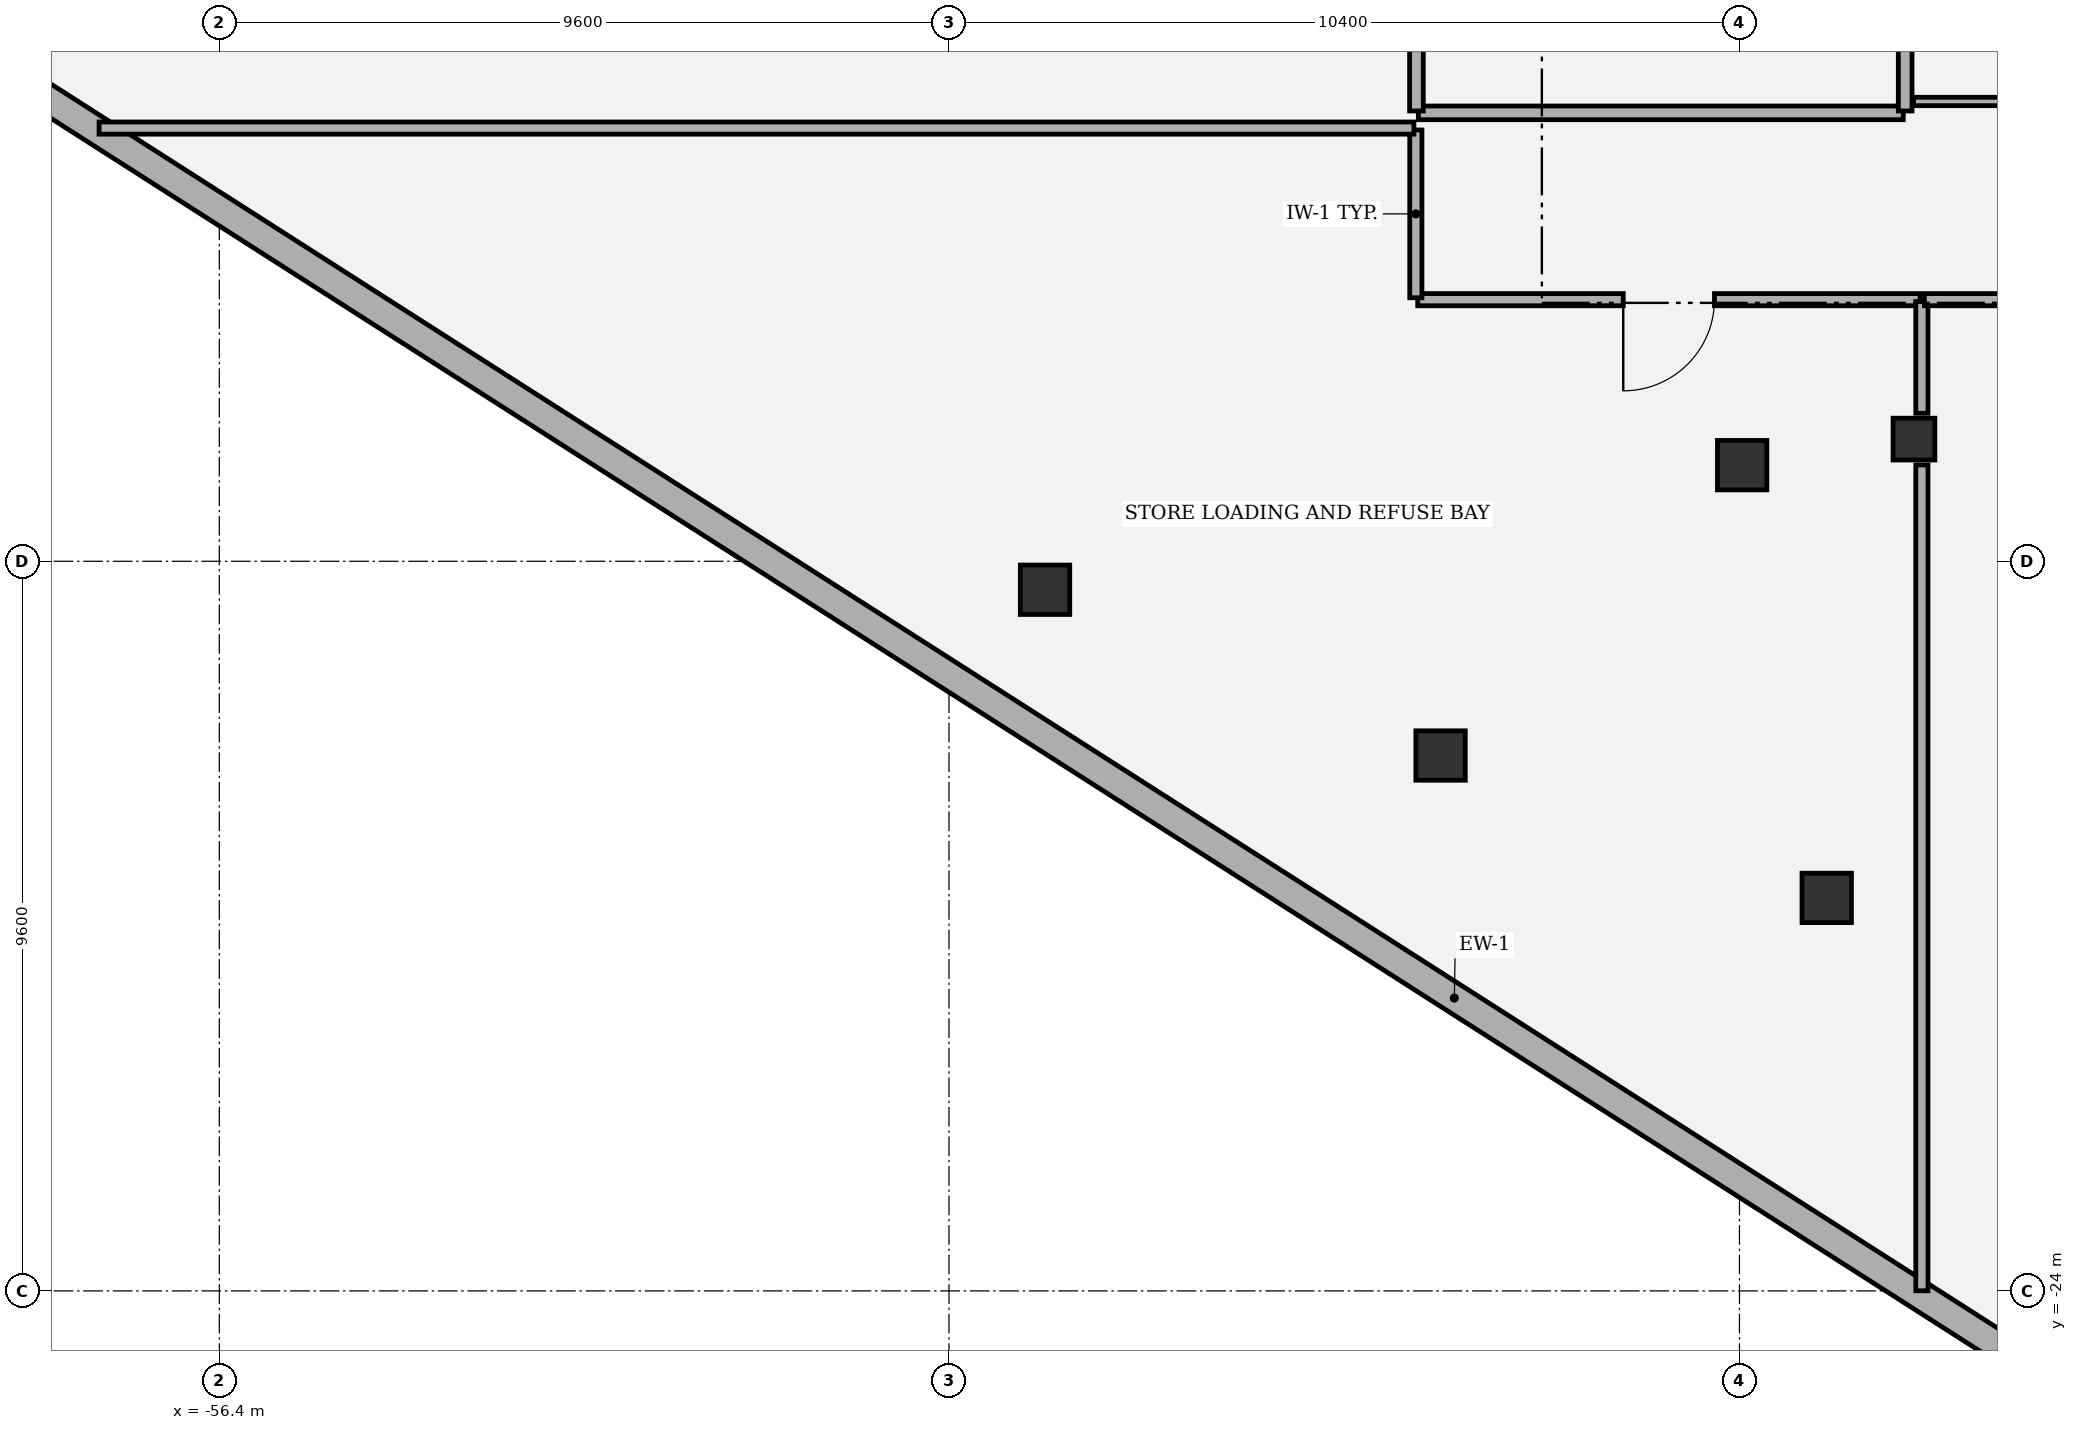
"""IFC4 building model, lengths in metres.
Left out: names, types, materials, properties, quantities, classifications, styles, units other than length and angle.
Written with IfcOpenShell. Run it as: python <this file> out.ifc"""

import sys

from ifc_helpers import new_model, si_unit, direction, frame, frame_2d, origin, origin_2d, place, context, subcontext, project, spatial, rectangle, extrude, element, fill, save


model = new_model("IFC4")
c1 = context("Model", 3, precision=1e-05, world=origin(), true_north=direction((0.0, 1.0)))
c2 = subcontext(c1, "Body", "Model", "MODEL_VIEW")
j1 = project(units=[si_unit("LENGTHUNIT", "METRE"), si_unit("PLANEANGLEUNIT", "RADIAN")], contexts=[c1])
p1 = place(None, origin())
s1 = spatial("IfcSite", under=j1, at=p1, CompositionType="ELEMENT")
p2 = place(p1, origin())
s2 = spatial("IfcBuilding", under=s1, at=p2, CompositionType="ELEMENT")
p3 = place(p2, origin())
s3 = spatial("IfcBuildingStorey", under=s2, at=p3, CompositionType="ELEMENT", Elevation=0.0)
for number, where, z_axis, x_axis in (
    (1, (-45.536, -14.775, 0.0), (0.0, 0.0, 1.0), (1.0, 0.0, 0.0)),
    (2, (-40.333, -16.956, 0.0), (0.0, 0.0, 1.0), (1.0, 0.0, 0.0)),
    (3, (-35.252, -18.829, 0.0), (0.0, 0.0, 1.0), (1.0, 0.0, 0.0)),
    (4, (-36.365, -13.135, 0.0), (0.0, 0.0, 1.0), (1.0, 0.0, 0.0)),
):
    element("IfcColumn", number, at=place(p3, frame(where, z_axis=z_axis, x_axis=x_axis)), inside=s3, PredefinedType="COLUMN", context=c2, shape_type="SweptSolid", body=[
        extrude(rectangle(XDim=0.65, YDim=0.65, at=origin_2d()), origin(), (0.0, 0.0, 1.0), 6.6),
    ])
p4 = place(p3, frame((-34.104, -12.792, 0.0), z_axis=(0.0, 0.0, 1.0), x_axis=(1.0, 0.0, 0.0)))
e5 = element("IfcColumn", 5, at=p4, inside=s3, PredefinedType="COLUMN", context=c2, shape_type="SweptSolid", body=[
    extrude(rectangle(XDim=0.55, YDim=0.55, at=origin_2d()), origin(), (0.0, 0.0, 1.0), 6.6),
])
p5 = place(p3, frame((-13.635, -37.094, 0.0), z_axis=(0.0, 0.0, 1.0), x_axis=(-0.842602364841, 0.538536214905, 0.0)))
e6 = element("IfcWall", 6, at=p5, inside=s3, PredefinedType="SOLIDWALL", context=c2, shape_type="SweptSolid", body=[
    extrude(rectangle(XDim=60.27, YDim=0.38, at=frame_2d((30.135, 0.0))), origin(), (0.0, 0.0, 1.0), 6.34),
])
p6 = place(p3, frame((-40.625, -8.5, 0.0), z_axis=(0.0, 0.0, 1.0), x_axis=(1.0, 0.0, 0.0)))
e7 = element("IfcWall", 7, at=p6, inside=s3, PredefinedType="PARTITIONING", context=c2, shape_type="SweptSolid", body=[
    extrude(rectangle(XDim=6.38, YDim=0.18, at=frame_2d((3.19, 0.0))), origin(), (0.0, 0.0, 1.0), 5.853),
])
p7 = place(p3, frame((-34.22, -8.475, 0.0), z_axis=(0.0, 0.0, 1.0), x_axis=(0.0, 1.0, 0.0)))
e8 = element("IfcWall", 8, at=p7, inside=s3, PredefinedType="PARTITIONING", context=c2, shape_type="SweptSolid", body=[
    extrude(rectangle(XDim=3.635, YDim=0.18, at=frame_2d((1.817, 0.0))), origin(), (0.0, 0.0, 1.0), 6.34),
])
p8 = place(p3, frame((-40.65, -8.475, 0.0), z_axis=(0.0, 0.0, 1.0), x_axis=(0.0, 1.0, 0.0)))
e9 = element("IfcWall", 9, at=p8, inside=s3, PredefinedType="PARTITIONING", context=c2, shape_type="SweptSolid", body=[
    extrude(rectangle(XDim=3.85, YDim=0.18, at=frame_2d((1.925, 0.0))), origin(), (0.0, 0.0, 1.0), 6.34),
])
p9 = place(p3, frame((-34.11, -8.35, 0.0), z_axis=(0.0, 0.0, 1.0), x_axis=(1.0, 0.0, 0.0)))
e10 = element("IfcWall", 10, at=p9, inside=s3, PredefinedType="PARTITIONING", context=c2, shape_type="SweptSolid", body=[
    extrude(rectangle(XDim=3.205, YDim=0.11, at=frame_2d((1.603, 0.0))), origin(), (0.0, 0.0, 1.0), 6.34),
])
p10 = place(p9, frame((1.163, 0.0, 0.0)))
e11 = element("IfcOpeningElement", 11, at=p10, cuts=e10, PredefinedType="OPENING", context=c2, shape_type="SweptSolid", body=[
    extrude(rectangle(XDim=0.88, YDim=2.1, at=frame_2d((0.44, 1.05))), frame((0.0, 0.065, 0.0), z_axis=(0.0, -1.0, 0.0), x_axis=(1.0, 0.0, 0.0)), (0.0, 0.0, 1.0), 0.13),
])
p11 = place(p3, frame((-34.025, -10.958, 0.0), z_axis=(0.0, 0.0, 1.0), x_axis=(-1.0, 0.0, 0.0)))
e12 = element("IfcWall", 12, at=p11, inside=s3, PredefinedType="PARTITIONING", context=c2, shape_type="SweptSolid", body=[
    extrude(rectangle(XDim=6.608, YDim=0.16, at=frame_2d((3.304, 0.0))), origin(), (0.0, 0.0, 1.0), 5.853),
])
p12 = place(p11, frame((2.704, 0.0, 0.0)))
e13 = element("IfcOpeningElement", 13, at=p12, cuts=e12, PredefinedType="OPENING", context=c2, shape_type="SweptSolid", body=[
    extrude(rectangle(XDim=1.2, YDim=2.15, at=frame_2d((0.6, 1.075))), frame((0.0, 0.09, 0.0), z_axis=(0.0, -1.0, 0.0), x_axis=(1.0, 0.0, 0.0)), (0.0, 0.0, 1.0), 0.18),
])
p13 = place(p3, frame((-40.658, -10.933, 0.0), z_axis=(0.0, 0.0, 1.0), x_axis=(0.0, 1.0, 0.0)))
e14 = element("IfcWall", 14, at=p13, inside=s3, PredefinedType="PARTITIONING", context=c2, shape_type="SweptSolid", body=[
    extrude(rectangle(XDim=2.208, YDim=0.16, at=frame_2d((1.104, 0.0))), origin(), (0.0, 0.0, 1.0), 6.34),
])
p14 = place(p3, frame((-40.683, -8.7, 0.0), z_axis=(0.0, 0.0, 1.0), x_axis=(-1.0, 0.0, 0.0)))
e15 = element("IfcWall", 15, at=p14, inside=s3, PredefinedType="PARTITIONING", context=c2, shape_type="SweptSolid", body=[
    extrude(rectangle(XDim=17.299, YDim=0.16, at=frame_2d((8.649, 0.0))), origin(), (0.0, 0.0, 1.0), 5.31),
])
p15 = place(p3, frame((-34.0, -23.999, 0.0), z_axis=(0.0, 0.0, 1.0), x_axis=(0.0, 1.0, 0.0)))
e16 = element("IfcWall", 16, at=p15, inside=s3, PredefinedType="PARTITIONING", context=c2, shape_type="SweptSolid", body=[
    extrude(rectangle(XDim=10.866, YDim=0.16, at=frame_2d((5.433, 0.0))), origin(), (0.0, 0.0, 1.0), 6.34),
])
p16 = place(p3, frame((-34.0, -12.452, 0.0), z_axis=(0.0, 0.0, 1.0), x_axis=(0.0, 1.0, 0.0)))
e17 = element("IfcWall", 17, at=p16, inside=s3, PredefinedType="PARTITIONING", context=c2, shape_type="SweptSolid", body=[
    extrude(rectangle(XDim=1.469, YDim=0.16, at=frame_2d((0.735, 0.0))), origin(), (0.0, 0.0, 1.0), 6.34),
])
p17 = place(p3, frame((-24.265, -10.958, 0.0), z_axis=(0.0, 0.0, 1.0), x_axis=(-1.0, 0.0, 0.0)))
e18 = element("IfcWall", 18, at=p17, inside=s3, PredefinedType="PARTITIONING", context=c2, shape_type="SweptSolid", body=[
    extrude(rectangle(XDim=9.702, YDim=0.16, at=frame_2d((4.851, 0.0))), origin(), (0.0, 0.0, 1.0), 5.853),
])
p18 = place(p17, frame((4.376, 0.0, 0.0)))
e19 = element("IfcOpeningElement", 19, at=p18, cuts=e18, PredefinedType="OPENING", context=c2, shape_type="SweptSolid", body=[
    extrude(rectangle(XDim=0.95, YDim=2.15, at=frame_2d((0.475, 1.075))), frame((0.0, 0.09, 0.0), z_axis=(0.0, -1.0, 0.0), x_axis=(1.0, 0.0, 0.0)), (0.0, 0.0, 1.0), 0.18),
])
p19 = place(p12, origin())
e20 = element("IfcDoor", 20, at=p19, inside=s3, OperationType="SINGLE_SWING_RIGHT", PredefinedType="DOOR", context=c2, shape_type="SweptSolid", body=[
    extrude(rectangle(XDim=1.2, YDim=2.15, at=frame_2d((0.6, 1.075))), frame((0.0, 0.025, 0.0), z_axis=(0.0, -1.0, 0.0), x_axis=(1.0, 0.0, 0.0)), (0.0, 0.0, 1.0), 0.05),
])
fill(e13, e20)
save(model, sys.argv[1])
